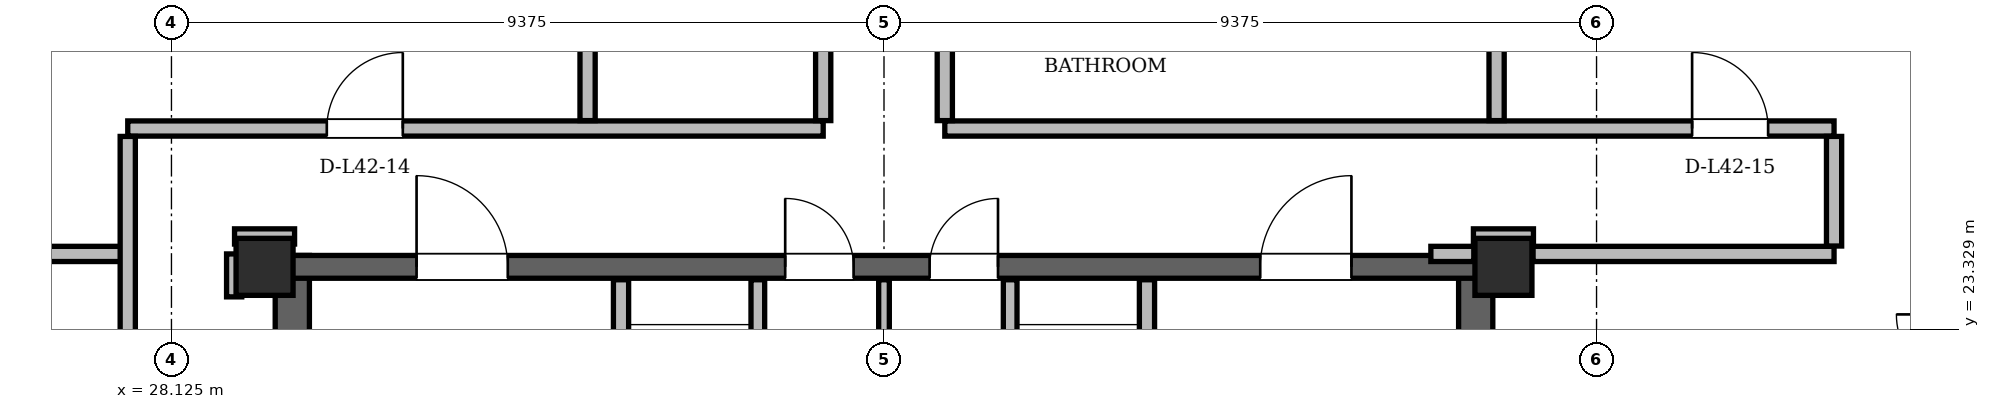
"""IFC4 building model, lengths in metres.
Left out: names, types, materials, properties, quantities, classifications, styles, units other than length and angle.
Written with IfcOpenShell. Run it as: python <this file> out.ifc"""

import sys

from ifc_helpers import new_model, si_unit, direction, frame, frame_2d, origin, origin_2d, place, context, subcontext, project, spatial, rectangle, hollow_rectangle, extrude, element, fill, save


model = new_model("IFC4")
c1 = context("Model", 3, precision=1e-05, world=origin(), true_north=direction((0.0, 1.0)))
c2 = subcontext(c1, "Body", "Model", "MODEL_VIEW")
j1 = project(units=[si_unit("LENGTHUNIT", "METRE"), si_unit("PLANEANGLEUNIT", "RADIAN")], contexts=[c1])
p1 = place(None, origin())
s1 = spatial("IfcSite", under=j1, at=p1, CompositionType="ELEMENT")
p2 = place(p1, origin())
s2 = spatial("IfcBuilding", under=s1, at=p2, CompositionType="ELEMENT")
p3 = place(p2, frame((0.0, 0.0, 160.2)))
s3 = spatial("IfcBuildingStorey", under=s2, at=p3, CompositionType="ELEMENT", Elevation=160.2)
for number, where, z_axis, x_axis in (
    (1, (45.65, 24.15, 0.0), (0.0, 0.0, 1.0), (1.0, 0.0, 0.0)),
    (2, (29.35, 24.15, 0.0), (0.0, 0.0, 1.0), (1.0, 0.0, 0.0)),
):
    element("IfcColumn", number, at=place(p3, frame(where, z_axis=z_axis, x_axis=x_axis)), inside=s3, PredefinedType="COLUMN", context=c2, shape_type="SweptSolid", body=[
        extrude(hollow_rectangle(XDim=0.75, YDim=0.75, WallThickness=0.06, at=origin_2d()), origin(), (0.0, 0.0, 1.0), 3.6),
    ])
for number, where, z_axis, x_axis in (
    (3, (29.715, 11.0, 0.0), (0.0, 0.0, 1.0), (0.0, 1.0, 0.0)),
    (4, (45.285, 11.0, 0.0), (0.0, 0.0, 1.0), (0.0, 1.0, 0.0)),
):
    element("IfcWall", number, at=place(p3, frame(where, z_axis=z_axis, x_axis=x_axis)), inside=s3, PredefinedType="SHEAR", context=c2, shape_type="SweptSolid", body=[
        extrude(rectangle(XDim=13.3, YDim=0.45, at=frame_2d((6.65, 0.0))), origin(), (0.0, 0.0, 1.0), 3.38),
    ])
p4 = place(p3, frame((29.65, 24.15, 0.0), z_axis=(0.0, 0.0, 1.0), x_axis=(1.0, 0.0, 0.0)))
e5 = element("IfcWall", 5, at=p4, inside=s3, PredefinedType="SHEAR", context=c2, shape_type="SweptSolid", body=[
    extrude(rectangle(XDim=15.7, YDim=0.3, at=frame_2d((7.85, 0.0))), origin(), (0.0, 0.0, 1.0), 3.38),
])
p5 = place(p4, frame((1.7, 0.0, 0.0)))
e6 = element("IfcOpeningElement", 6, at=p5, cuts=e5, PredefinedType="OPENING", context=c2, shape_type="SweptSolid", body=[
    extrude(rectangle(XDim=1.2, YDim=2.2, at=frame_2d((0.6, 1.1))), frame((0.0, 0.15, 0.0), z_axis=(0.0, -1.0, 0.0), x_axis=(1.0, 0.0, 0.0)), (0.0, 0.0, 1.0), 0.3),
])
p6 = place(p4, frame((12.8, 0.0, 0.0)))
e7 = element("IfcOpeningElement", 7, at=p6, cuts=e5, PredefinedType="OPENING", context=c2, shape_type="SweptSolid", body=[
    extrude(rectangle(XDim=1.2, YDim=2.2, at=frame_2d((0.6, 1.1))), frame((0.0, 0.15, 0.0), z_axis=(0.0, -1.0, 0.0), x_axis=(1.0, 0.0, 0.0)), (0.0, 0.0, 1.0), 0.3),
])
p7 = place(p4, frame((6.55, 0.0, 0.0)))
e8 = element("IfcOpeningElement", 8, at=p7, cuts=e5, PredefinedType="OPENING", context=c2, shape_type="SweptSolid", body=[
    extrude(rectangle(XDim=0.9, YDim=2.05, at=frame_2d((0.45, 1.025))), frame((0.0, 0.15, 0.0), z_axis=(0.0, -1.0, 0.0), x_axis=(1.0, 0.0, 0.0)), (0.0, 0.0, 1.0), 0.3),
])
p8 = place(p4, frame((8.45, 0.0, 0.0)))
e9 = element("IfcOpeningElement", 9, at=p8, cuts=e5, PredefinedType="OPENING", context=c2, shape_type="SweptSolid", body=[
    extrude(rectangle(XDim=0.9, YDim=2.05, at=frame_2d((0.45, 1.025))), frame((0.0, 0.15, 0.0), z_axis=(0.0, -1.0, 0.0), x_axis=(1.0, 0.0, 0.0)), (0.0, 0.0, 1.0), 0.3),
])
p9 = place(p3, frame((59.853, 12.41, 0.0), z_axis=(0.0, 0.0, 1.0), x_axis=(-0.499995364632, 0.866028079999, 0.0)))
e10 = element("IfcWall", 10, at=p9, inside=s3, PredefinedType="SOLIDWALL", context=c2, shape_type="SweptSolid", body=[
    extrude(rectangle(XDim=35.673, YDim=0.34, at=frame_2d((17.836, 0.0))), origin(), (0.0, 0.0, 1.0), 2.6),
])
p10 = place(p9, frame((6.579, 0.0, 0.0)))
e11 = element("IfcOpeningElement", 11, at=p10, cuts=e10, PredefinedType="OPENING", context=c2, shape_type="SweptSolid", body=[
    extrude(rectangle(XDim=1.5, YDim=2.2, at=frame_2d((0.75, 1.1))), frame((0.0, 0.17, 0.0), z_axis=(0.0, -1.0, 0.0), x_axis=(1.0, 0.0, 0.0)), (0.0, 0.0, 1.0), 0.34),
])
p11 = place(p9, frame((26.238, 0.0, 0.0)))
e12 = element("IfcOpeningElement", 12, at=p11, cuts=e10, PredefinedType="OPENING", context=c2, shape_type="SweptSolid", body=[
    extrude(rectangle(XDim=1.3, YDim=2.2, at=frame_2d((0.65, 1.1))), frame((0.0, 0.17, 0.0), z_axis=(0.0, -1.0, 0.0), x_axis=(1.0, 0.0, 0.0)), (0.0, 0.0, 1.0), 0.34),
])
p12 = place(p9, frame((0.99, 0.0, 0.85)))
e13 = element("IfcOpeningElement", 13, at=p12, cuts=e10, PredefinedType="OPENING", context=c2, shape_type="SweptSolid", body=[
    extrude(rectangle(XDim=1.2, YDim=1.48, at=frame_2d((0.6, 0.74))), frame((0.0, 0.17, 0.0), z_axis=(0.0, -1.0, 0.0), x_axis=(1.0, 0.0, 0.0)), (0.0, 0.0, 1.0), 0.34),
])
p13 = place(p9, frame((2.449, 0.0, 0.85)))
e14 = element("IfcOpeningElement", 14, at=p13, cuts=e10, PredefinedType="OPENING", context=c2, shape_type="SweptSolid", body=[
    extrude(rectangle(XDim=1.2, YDim=1.48, at=frame_2d((0.6, 0.74))), frame((0.0, 0.17, 0.0), z_axis=(0.0, -1.0, 0.0), x_axis=(1.0, 0.0, 0.0)), (0.0, 0.0, 1.0), 0.34),
])
p14 = place(p9, frame((16.807, 0.0, 0.85)))
e15 = element("IfcOpeningElement", 15, at=p14, cuts=e10, PredefinedType="OPENING", context=c2, shape_type="SweptSolid", body=[
    extrude(rectangle(XDim=3.0, YDim=1.64, at=frame_2d((1.5, 0.82))), frame((0.0, 0.17, 0.0), z_axis=(0.0, -1.0, 0.0), x_axis=(1.0, 0.0, 0.0)), (0.0, 0.0, 1.0), 0.34),
])
p15 = place(p9, frame((22.859, 0.0, 0.85)))
e16 = element("IfcOpeningElement", 16, at=p15, cuts=e10, PredefinedType="OPENING", context=c2, shape_type="SweptSolid", body=[
    extrude(rectangle(XDim=1.2, YDim=1.48, at=frame_2d((0.6, 0.74))), frame((0.0, 0.17, 0.0), z_axis=(0.0, -1.0, 0.0), x_axis=(1.0, 0.0, 0.0)), (0.0, 0.0, 1.0), 0.34),
])
p16 = place(p9, frame((13.203, 0.0, 0.85)))
e17 = element("IfcOpeningElement", 17, at=p16, cuts=e10, PredefinedType="OPENING", context=c2, shape_type="SweptSolid", body=[
    extrude(rectangle(XDim=1.2, YDim=1.48, at=frame_2d((0.6, 0.74))), frame((0.0, 0.17, 0.0), z_axis=(0.0, -1.0, 0.0), x_axis=(1.0, 0.0, 0.0)), (0.0, 0.0, 1.0), 0.34),
])
p17 = place(p9, frame((31.37, 0.0, 0.85)))
e18 = element("IfcOpeningElement", 18, at=p17, cuts=e10, PredefinedType="OPENING", context=c2, shape_type="SweptSolid", body=[
    extrude(rectangle(XDim=3.0, YDim=1.64, at=frame_2d((1.5, 0.82))), frame((0.0, 0.17, 0.0), z_axis=(0.0, -1.0, 0.0), x_axis=(1.0, 0.0, 0.0)), (0.0, 0.0, 1.0), 0.34),
])
p18 = place(p3, frame((32.983, 43.303, 0.0), z_axis=(0.0, 0.0, 1.0), x_axis=(-0.499995364632, -0.866028079999, 0.0)))
e19 = element("IfcWall", 19, at=p18, inside=s3, PredefinedType="SOLIDWALL", context=c2, shape_type="SweptSolid", body=[
    extrude(rectangle(XDim=35.673, YDim=0.34, at=frame_2d((17.836, 0.0))), origin(), (0.0, 0.0, 1.0), 2.6),
])
p19 = place(p18, frame((6.76, 0.0, 0.0)))
e20 = element("IfcOpeningElement", 20, at=p19, cuts=e19, PredefinedType="OPENING", context=c2, shape_type="SweptSolid", body=[
    extrude(rectangle(XDim=1.0, YDim=2.18, at=frame_2d((0.5, 1.09))), frame((0.0, 0.17, 0.0), z_axis=(0.0, -1.0, 0.0), x_axis=(1.0, 0.0, 0.0)), (0.0, 0.0, 1.0), 0.34),
])
p20 = place(p18, frame((26.558, 0.0, 0.0)))
e21 = element("IfcOpeningElement", 21, at=p20, cuts=e19, PredefinedType="OPENING", context=c2, shape_type="SweptSolid", body=[
    extrude(rectangle(XDim=1.5, YDim=2.2, at=frame_2d((0.75, 1.1))), frame((0.0, 0.17, 0.0), z_axis=(0.0, -1.0, 0.0), x_axis=(1.0, 0.0, 0.0)), (0.0, 0.0, 1.0), 0.34),
])
p21 = place(p18, frame((22.231, 0.0, 0.85)))
e22 = element("IfcOpeningElement", 22, at=p21, cuts=e19, PredefinedType="OPENING", context=c2, shape_type="SweptSolid", body=[
    extrude(rectangle(XDim=1.2, YDim=1.48, at=frame_2d((0.6, 0.74))), frame((0.0, 0.17, 0.0), z_axis=(0.0, -1.0, 0.0), x_axis=(1.0, 0.0, 0.0)), (0.0, 0.0, 1.0), 0.34),
])
p22 = place(p18, frame((11.758, 0.0, 0.85)))
e23 = element("IfcOpeningElement", 23, at=p22, cuts=e19, PredefinedType="OPENING", context=c2, shape_type="SweptSolid", body=[
    extrude(rectangle(XDim=2.2, YDim=1.64, at=frame_2d((1.1, 0.82))), frame((0.0, 0.17, 0.0), z_axis=(0.0, -1.0, 0.0), x_axis=(1.0, 0.0, 0.0)), (0.0, 0.0, 1.0), 0.34),
])
p23 = place(p18, frame((18.257, 0.0, 0.85)))
e24 = element("IfcOpeningElement", 24, at=p23, cuts=e19, PredefinedType="OPENING", context=c2, shape_type="SweptSolid", body=[
    extrude(rectangle(XDim=1.6, YDim=1.64, at=frame_2d((0.8, 0.82))), frame((0.0, 0.17, 0.0), z_axis=(0.0, -1.0, 0.0), x_axis=(1.0, 0.0, 0.0)), (0.0, 0.0, 1.0), 0.34),
])
p24 = place(p18, frame((1.108, 0.0, 0.85)))
e25 = element("IfcOpeningElement", 25, at=p24, cuts=e19, PredefinedType="OPENING", context=c2, shape_type="SweptSolid", body=[
    extrude(rectangle(XDim=1.8, YDim=1.64, at=frame_2d((0.9, 0.82))), frame((0.0, 0.17, 0.0), z_axis=(0.0, -1.0, 0.0), x_axis=(1.0, 0.0, 0.0)), (0.0, 0.0, 1.0), 0.34),
])
p25 = place(p18, frame((30.513, 0.0, 0.85)))
e26 = element("IfcOpeningElement", 26, at=p25, cuts=e19, PredefinedType="OPENING", context=c2, shape_type="SweptSolid", body=[
    extrude(rectangle(XDim=1.2, YDim=1.48, at=frame_2d((0.6, 0.74))), frame((0.0, 0.17, 0.0), z_axis=(0.0, -1.0, 0.0), x_axis=(1.0, 0.0, 0.0)), (0.0, 0.0, 1.0), 0.34),
])
p26 = place(p3, frame((34.04, 19.48, 0.0), z_axis=(0.0, 0.0, 1.0), x_axis=(0.0, 1.0, 0.0)))
e27 = element("IfcWall", 27, at=p26, inside=s3, PredefinedType="PARTITIONING", context=c2, shape_type="SweptSolid", body=[
    extrude(rectangle(XDim=4.5, YDim=0.2, at=frame_2d((2.25, 0.0))), origin(), (0.0, 0.0, 1.0), 2.42),
])
p27 = place(p26, frame((2.12, 0.0, 0.0)))
e28 = element("IfcOpeningElement", 28, at=p27, cuts=e27, PredefinedType="OPENING", context=c2, shape_type="SweptSolid", body=[
    extrude(rectangle(XDim=1.1, YDim=2.2, at=frame_2d((0.55, 1.1))), frame((0.0, 0.1, 0.0), z_axis=(0.0, -1.0, 0.0), x_axis=(1.0, 0.0, 0.0)), (0.0, 0.0, 1.0), 0.2),
])
p28 = place(p3, frame((35.84, 20.96, 0.0), z_axis=(0.0, 0.0, 1.0), x_axis=(0.0, 1.0, 0.0)))
e29 = element("IfcWall", 29, at=p28, inside=s3, PredefinedType="PARTITIONING", context=c2, shape_type="SweptSolid", body=[
    extrude(rectangle(XDim=3.02, YDim=0.18, at=frame_2d((1.51, 0.0))), origin(), (0.0, 0.0, 1.0), 2.42),
])
p29 = place(p3, frame((40.96, 19.48, 0.0), z_axis=(0.0, 0.0, 1.0), x_axis=(0.0, 1.0, 0.0)))
e30 = element("IfcWall", 30, at=p29, inside=s3, PredefinedType="PARTITIONING", context=c2, shape_type="SweptSolid", body=[
    extrude(rectangle(XDim=4.5, YDim=0.2, at=frame_2d((2.25, 0.0))), origin(), (0.0, 0.0, 1.0), 2.42),
])
p30 = place(p29, frame((2.12, 0.0, 0.0)))
e31 = element("IfcOpeningElement", 31, at=p30, cuts=e30, PredefinedType="OPENING", context=c2, shape_type="SweptSolid", body=[
    extrude(rectangle(XDim=1.1, YDim=2.2, at=frame_2d((0.55, 1.1))), frame((0.0, 0.1, 0.0), z_axis=(0.0, -1.0, 0.0), x_axis=(1.0, 0.0, 0.0)), (0.0, 0.0, 1.0), 0.2),
])
p31 = place(p3, frame((39.16, 20.96, 0.0), z_axis=(0.0, 0.0, 1.0), x_axis=(0.0, 1.0, 0.0)))
e32 = element("IfcWall", 32, at=p31, inside=s3, PredefinedType="PARTITIONING", context=c2, shape_type="SweptSolid", body=[
    extrude(rectangle(XDim=3.02, YDim=0.18, at=frame_2d((1.51, 0.0))), origin(), (0.0, 0.0, 1.0), 2.42),
])
p32 = place(p3, frame((37.5, 21.06, 0.0), z_axis=(0.0, 0.0, 1.0), x_axis=(0.0, 1.0, 0.0)))
e33 = element("IfcWall", 33, at=p32, inside=s3, PredefinedType="PARTITIONING", context=c2, shape_type="SweptSolid", body=[
    extrude(rectangle(XDim=2.92, YDim=0.14, at=frame_2d((1.46, 0.0))), origin(), (0.0, 0.0, 1.0), 2.42),
])
p33 = place(p3, frame((22.224, 24.32, 0.0), z_axis=(0.0, 0.0, 1.0), x_axis=(1.0, 0.0, 0.0)))
e34 = element("IfcWall", 34, at=p33, inside=s3, PredefinedType="PARTITIONING", context=c2, shape_type="SweptSolid", body=[
    extrude(rectangle(XDim=5.326, YDim=0.2, at=frame_2d((2.663, 0.0))), origin(), (0.0, 0.0, 1.0), 3.38),
])
p34 = place(p3, frame((44.695, 24.32, 0.0), z_axis=(0.0, 0.0, 1.0), x_axis=(1.0, 0.0, 0.0)))
e35 = element("IfcWall", 35, at=p34, inside=s3, PredefinedType="PARTITIONING", context=c2, shape_type="SweptSolid", body=[
    extrude(rectangle(XDim=0.565, YDim=0.2, at=frame_2d((0.282, 0.0))), origin(), (0.0, 0.0, 1.0), 2.42),
])
p35 = place(p3, frame((46.04, 24.32, 0.0), z_axis=(0.0, 0.0, 1.0), x_axis=(1.0, 0.0, 0.0)))
e36 = element("IfcWall", 36, at=p35, inside=s3, PredefinedType="PARTITIONING", context=c2, shape_type="SweptSolid", body=[
    extrude(rectangle(XDim=3.96, YDim=0.2, at=frame_2d((1.98, 0.0))), origin(), (0.0, 0.0, 1.0), 3.38),
])
for number, where, z_axis, x_axis in (
    (37, (28.955, 24.55, 0.0), (0.0, 0.0, 1.0), (1.0, 0.0, 0.0)),
    (38, (45.255, 24.55, 0.0), (0.0, 0.0, 1.0), (1.0, 0.0, 0.0)),
):
    element("IfcWall", number, at=place(p3, frame(where, z_axis=z_axis, x_axis=x_axis)), inside=s3, PredefinedType="PARTITIONING", context=c2, shape_type="SweptSolid", body=[
        extrude(rectangle(XDim=0.79, YDim=0.2, at=frame_2d((0.395, 0.0))), origin(), (0.0, 0.0, 1.0), 2.842),
    ])
p36 = place(p3, frame((27.55, 25.97, 0.0), z_axis=(0.0, 0.0, 1.0), x_axis=(1.0, 0.0, 0.0)))
e39 = element("IfcWall", 39, at=p36, inside=s3, PredefinedType="PARTITIONING", context=c2, shape_type="SweptSolid", body=[
    extrude(rectangle(XDim=9.15, YDim=0.2, at=frame_2d((4.575, 0.0))), origin(), (0.0, 0.0, 1.0), 2.842),
])
p37 = place(p36, frame((2.619, 0.0, 0.0)))
e40 = element("IfcOpeningElement", 40, at=p37, cuts=e39, PredefinedType="OPENING", context=c2, shape_type="SweptSolid", body=[
    extrude(rectangle(XDim=1.0, YDim=2.18, at=frame_2d((0.5, 1.09))), frame((0.0, 0.1, 0.0), z_axis=(0.0, -1.0, 0.0), x_axis=(1.0, 0.0, 0.0)), (0.0, 0.0, 1.0), 0.2),
])
p38 = place(p3, frame((38.3, 25.97, 0.0), z_axis=(0.0, 0.0, 1.0), x_axis=(1.0, 0.0, 0.0)))
e41 = element("IfcWall", 41, at=p38, inside=s3, PredefinedType="PARTITIONING", context=c2, shape_type="SweptSolid", body=[
    extrude(rectangle(XDim=11.7, YDim=0.2, at=frame_2d((5.85, 0.0))), origin(), (0.0, 0.0, 1.0), 2.842),
])
p39 = place(p38, frame((9.832, 0.0, 0.0)))
e42 = element("IfcOpeningElement", 42, at=p39, cuts=e41, PredefinedType="OPENING", context=c2, shape_type="SweptSolid", body=[
    extrude(rectangle(XDim=1.0, YDim=2.18, at=frame_2d((0.5, 1.09))), frame((0.0, 0.1, 0.0), z_axis=(0.0, -1.0, 0.0), x_axis=(1.0, 0.0, 0.0)), (0.0, 0.0, 1.0), 0.2),
])
p40 = place(p3, frame((27.55, 18.554, 0.0), z_axis=(0.0, 0.0, 1.0), x_axis=(0.0, 1.0, 0.0)))
e43 = element("IfcWall", 43, at=p40, inside=s3, PredefinedType="PARTITIONING", context=c2, shape_type="SweptSolid", body=[
    extrude(rectangle(XDim=7.312, YDim=0.2, at=frame_2d((3.656, 0.0))), origin(), (0.0, 0.0, 1.0), 3.38),
])
p41 = place(p3, frame((28.95, 23.755, 0.0), z_axis=(0.0, 0.0, 1.0), x_axis=(0.0, 1.0, 0.0)))
e44 = element("IfcWall", 44, at=p41, inside=s3, PredefinedType="PARTITIONING", context=c2, shape_type="SweptSolid", body=[
    extrude(rectangle(XDim=0.565, YDim=0.2, at=frame_2d((0.283, 0.0))), origin(), (0.0, 0.0, 1.0), 3.38),
])
p42 = place(p3, frame((33.6, 26.074, 0.0), z_axis=(0.0, 0.0, 1.0), x_axis=(0.0, 1.0, 0.0)))
e45 = element("IfcWall", 45, at=p42, inside=s3, PredefinedType="PARTITIONING", context=c2, shape_type="SweptSolid", body=[
    extrude(rectangle(XDim=17.055, YDim=0.2, at=frame_2d((8.528, 0.0))), origin(), (0.0, 0.0, 1.0), 3.38),
])
p43 = place(p3, frame((36.7, 26.074, 0.0), z_axis=(0.0, 0.0, 1.0), x_axis=(0.0, 1.0, 0.0)))
e46 = element("IfcWall", 46, at=p43, inside=s3, PredefinedType="PARTITIONING", context=c2, shape_type="SweptSolid", body=[
    extrude(rectangle(XDim=17.055, YDim=0.2, at=frame_2d((8.528, 0.0))), origin(), (0.0, 0.0, 1.0), 3.38),
])
p44 = place(p43, frame((8.67, 0.0, 0.0)))
e47 = element("IfcOpeningElement", 47, at=p44, cuts=e46, PredefinedType="OPENING", context=c2, shape_type="SweptSolid", body=[
    extrude(rectangle(XDim=1.0, YDim=2.18, at=frame_2d((0.5, 1.09))), frame((0.0, 0.1, 0.0), z_axis=(0.0, -1.0, 0.0), x_axis=(1.0, 0.0, 0.0)), (0.0, 0.0, 1.0), 0.2),
])
p45 = place(p3, frame((38.3, 26.074, 0.0), z_axis=(0.0, 0.0, 1.0), x_axis=(0.0, 1.0, 0.0)))
e48 = element("IfcWall", 48, at=p45, inside=s3, PredefinedType="PARTITIONING", context=c2, shape_type="SweptSolid", body=[
    extrude(rectangle(XDim=13.422, YDim=0.2, at=frame_2d((6.711, 0.0))), origin(), (0.0, 0.0, 1.0), 3.38),
])
p46 = place(p45, frame((7.137, 0.0, 0.0)))
e49 = element("IfcOpeningElement", 49, at=p46, cuts=e48, PredefinedType="OPENING", context=c2, shape_type="SweptSolid", body=[
    extrude(rectangle(XDim=1.0, YDim=2.18, at=frame_2d((0.5, 1.09))), frame((0.0, 0.1, 0.0), z_axis=(0.0, -1.0, 0.0), x_axis=(1.0, 0.0, 0.0)), (0.0, 0.0, 1.0), 0.2),
])
p47 = place(p3, frame((45.56, 26.074, 0.0), z_axis=(0.0, 0.0, 1.0), x_axis=(0.0, 1.0, 0.0)))
e50 = element("IfcWall", 50, at=p47, inside=s3, PredefinedType="PARTITIONING", context=c2, shape_type="SweptSolid", body=[
    extrude(rectangle(XDim=10.744, YDim=0.2, at=frame_2d((5.372, 0.0))), origin(), (0.0, 0.0, 1.0), 3.38),
])
p48 = place(p3, frame((50.0, 24.424, 0.0), z_axis=(0.0, 0.0, 1.0), x_axis=(0.0, 1.0, 0.0)))
e51 = element("IfcWall", 51, at=p48, inside=s3, PredefinedType="PARTITIONING", context=c2, shape_type="SweptSolid", body=[
    extrude(rectangle(XDim=1.442, YDim=0.2, at=frame_2d((0.721, 0.0))), origin(), (0.0, 0.0, 1.0), 3.38),
])
p49 = place(p14, origin())
e52 = element("IfcWindow", 52, at=p49, inside=s3, PartitioningType="SINGLE_PANEL", PredefinedType="WINDOW", context=c2, shape_type="SweptSolid", body=[
    extrude(rectangle(XDim=3.0, YDim=1.64, at=frame_2d((1.5, 0.82))), frame((0.0, 0.03, 0.0), z_axis=(0.0, -1.0, 0.0), x_axis=(1.0, 0.0, 0.0)), (0.0, 0.0, 1.0), 0.06),
])
fill(e15, e52)
p50 = place(p5, origin())
e53 = element("IfcDoor", 53, at=p50, inside=s3, OperationType="SINGLE_SWING_LEFT", PredefinedType="DOOR", context=c2, shape_type="SweptSolid", body=[
    extrude(rectangle(XDim=1.2, YDim=2.2, at=frame_2d((0.6, 1.1))), frame((0.0, 0.025, 0.0), z_axis=(0.0, -1.0, 0.0), x_axis=(1.0, 0.0, 0.0)), (0.0, 0.0, 1.0), 0.05),
])
fill(e6, e53)
p51 = place(p6, origin())
e54 = element("IfcDoor", 54, at=p51, inside=s3, OperationType="SINGLE_SWING_RIGHT", PredefinedType="DOOR", context=c2, shape_type="SweptSolid", body=[
    extrude(rectangle(XDim=1.2, YDim=2.2, at=frame_2d((0.6, 1.1))), frame((0.0, 0.025, 0.0), z_axis=(0.0, -1.0, 0.0), x_axis=(1.0, 0.0, 0.0)), (0.0, 0.0, 1.0), 0.05),
])
fill(e7, e54)
p52 = place(p7, origin())
e55 = element("IfcDoor", 55, at=p52, inside=s3, OperationType="SINGLE_SWING_LEFT", PredefinedType="DOOR", context=c2, shape_type="SweptSolid", body=[
    extrude(rectangle(XDim=0.9, YDim=2.05, at=frame_2d((0.45, 1.025))), frame((0.0, 0.025, 0.0), z_axis=(0.0, -1.0, 0.0), x_axis=(1.0, 0.0, 0.0)), (0.0, 0.0, 1.0), 0.05),
])
fill(e8, e55)
p53 = place(p8, origin())
e56 = element("IfcDoor", 56, at=p53, inside=s3, OperationType="SINGLE_SWING_RIGHT", PredefinedType="DOOR", context=c2, shape_type="SweptSolid", body=[
    extrude(rectangle(XDim=0.9, YDim=2.05, at=frame_2d((0.45, 1.025))), frame((0.0, 0.025, 0.0), z_axis=(0.0, -1.0, 0.0), x_axis=(1.0, 0.0, 0.0)), (0.0, 0.0, 1.0), 0.05),
])
fill(e9, e56)
p54 = place(p37, origin())
e57 = element("IfcDoor", 57, at=p54, inside=s3, OperationType="SINGLE_SWING_RIGHT", PredefinedType="DOOR", context=c2, shape_type="SweptSolid", body=[
    extrude(rectangle(XDim=1.0, YDim=2.18, at=frame_2d((0.5, 1.09))), frame((0.0, 0.025, 0.0), z_axis=(0.0, -1.0, 0.0), x_axis=(1.0, 0.0, 0.0)), (0.0, 0.0, 1.0), 0.05),
])
fill(e40, e57)
p55 = place(p39, origin())
e58 = element("IfcDoor", 58, at=p55, inside=s3, OperationType="SINGLE_SWING_LEFT", PredefinedType="DOOR", context=c2, shape_type="SweptSolid", body=[
    extrude(rectangle(XDim=1.0, YDim=2.18, at=frame_2d((0.5, 1.09))), frame((0.0, 0.025, 0.0), z_axis=(0.0, -1.0, 0.0), x_axis=(1.0, 0.0, 0.0)), (0.0, 0.0, 1.0), 0.05),
])
fill(e42, e58)
save(model, sys.argv[1])
